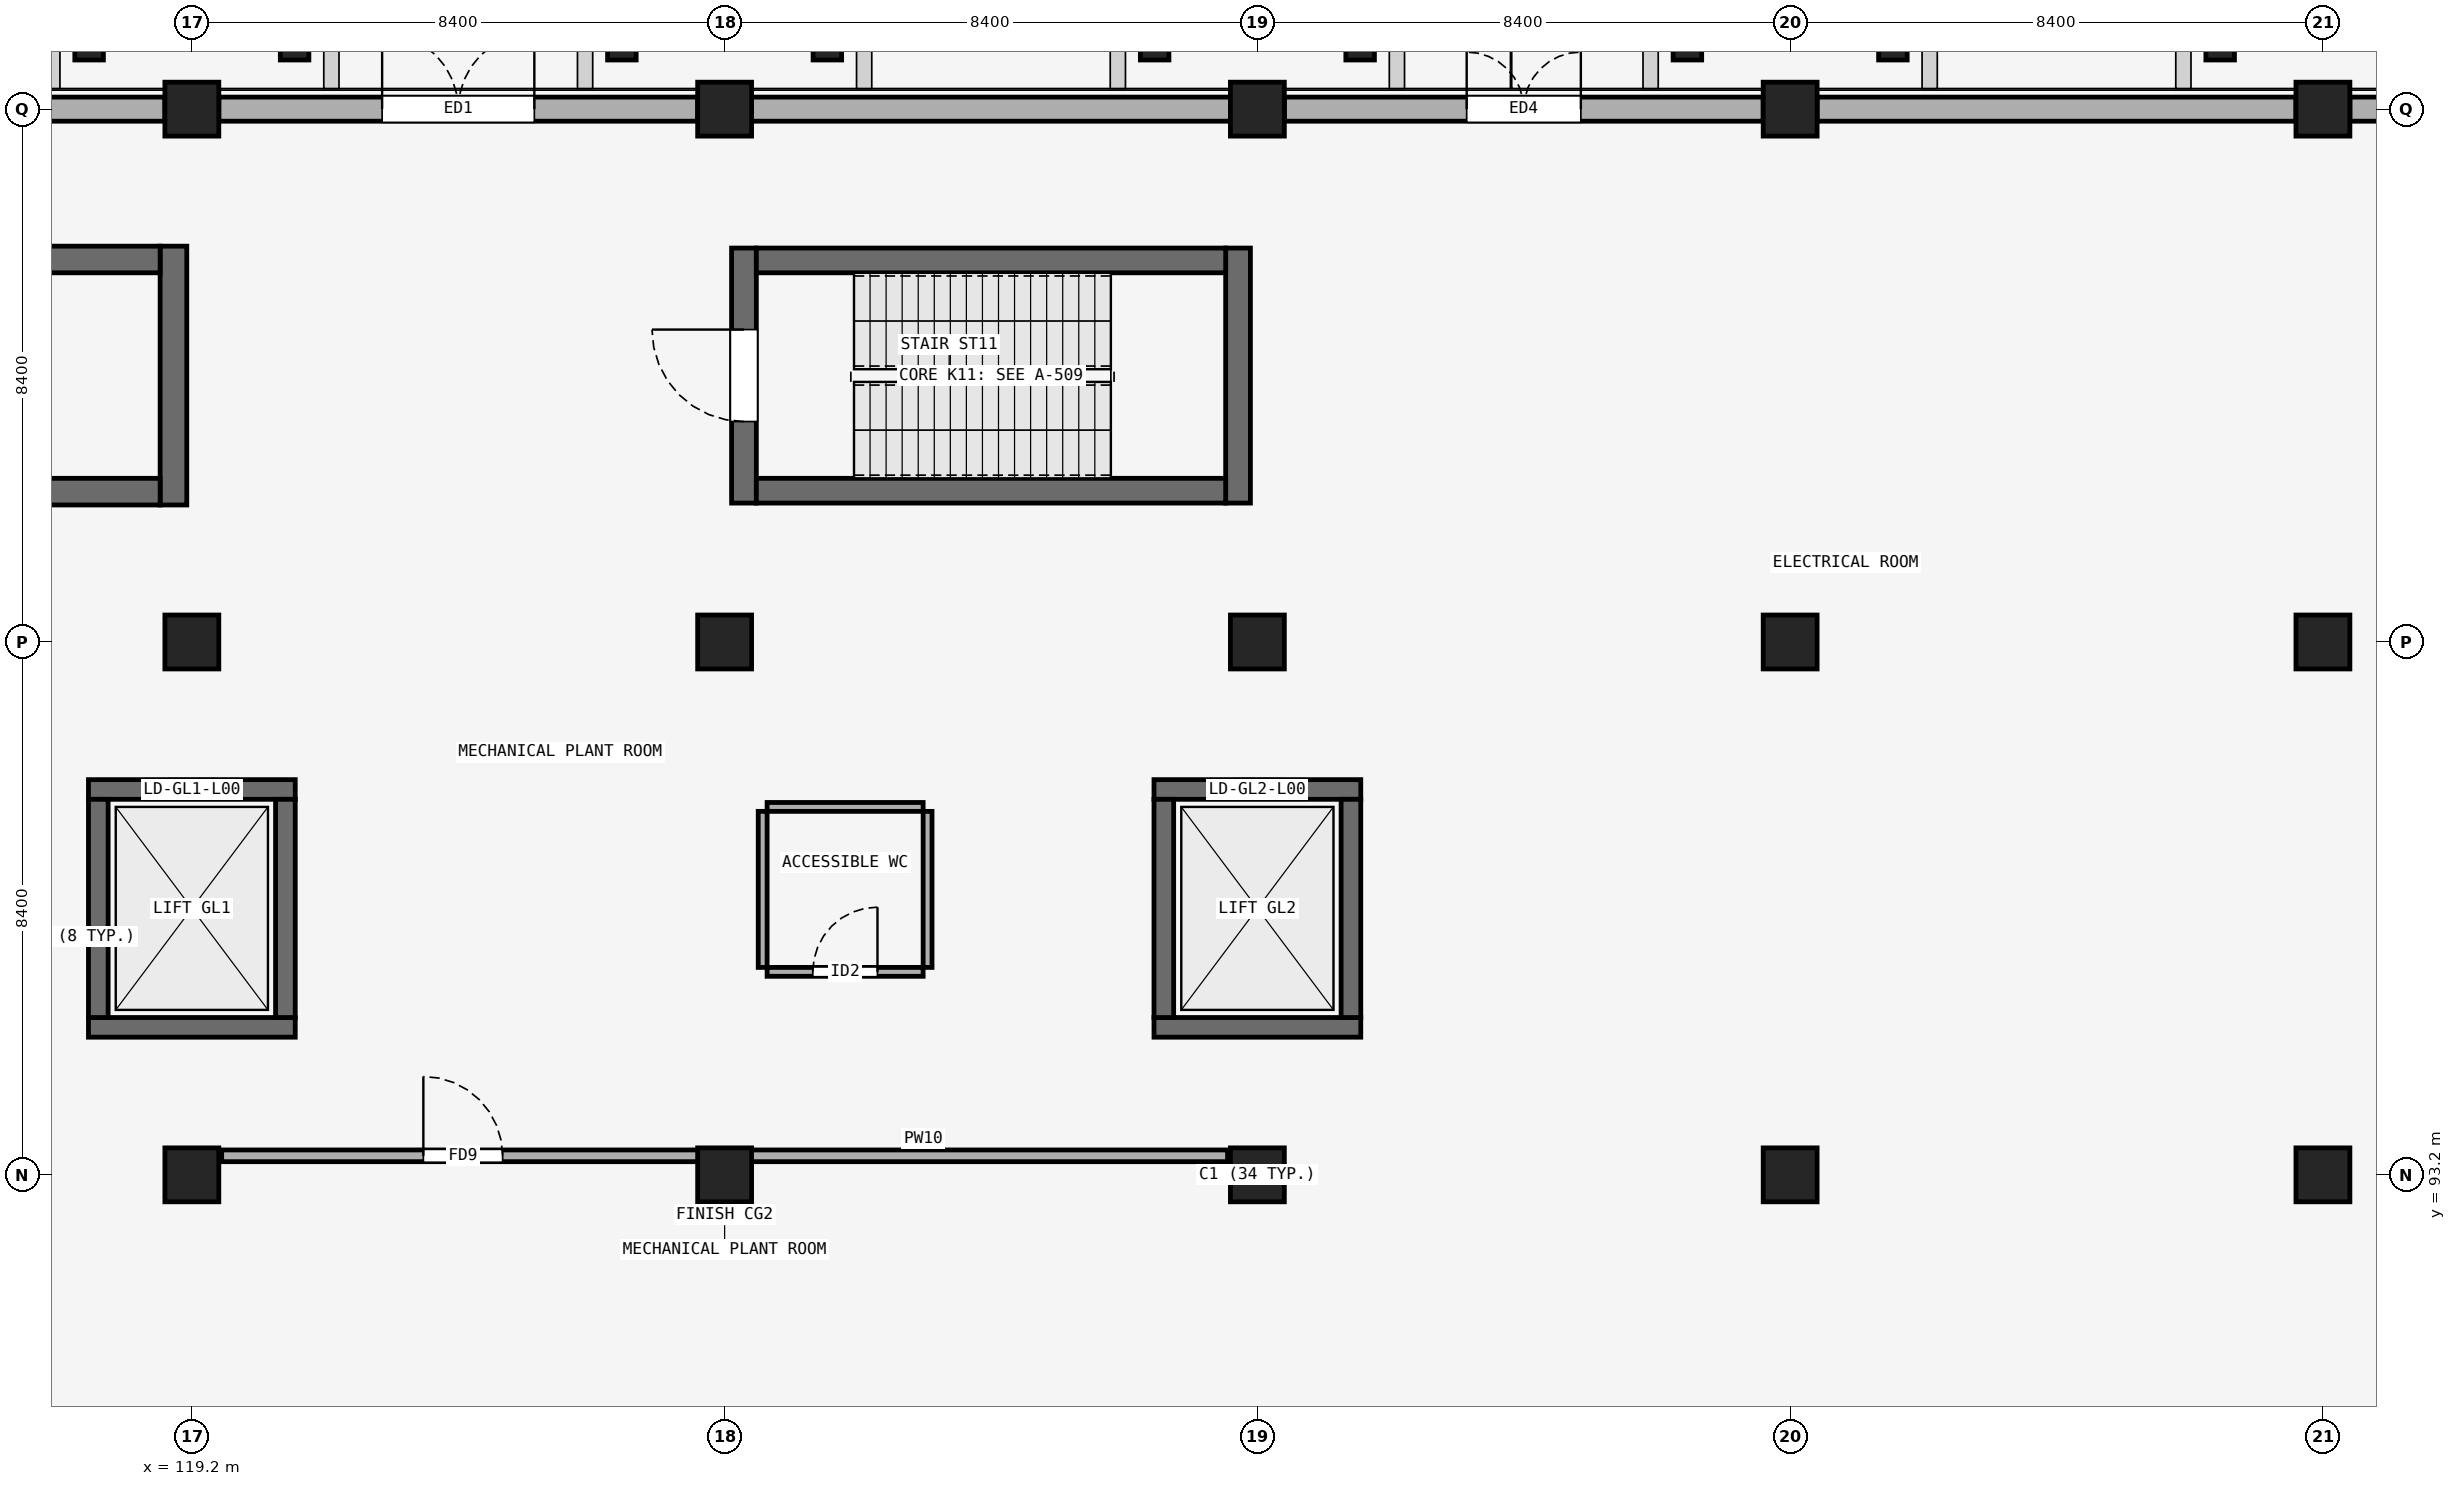
"""IFC4 building model, lengths in metres.
Left out: names, types, materials, properties, quantities, classifications, styles, units other than length and angle.
Written with IfcOpenShell. Run it as: python <this file> out.ifc"""

import sys

from ifc_helpers import new_model, si_unit, direction, frame, frame_2d, origin, origin_2d, place, context, subcontext, project, spatial, rectangle, extrude, element, fill, save


model = new_model("IFC4")
c1 = context("Model", 3, precision=1e-05, world=origin(), true_north=direction((0.0, 1.0)))
c2 = subcontext(c1, "Body", "Model", "MODEL_VIEW")
j1 = project(units=[si_unit("LENGTHUNIT", "METRE"), si_unit("PLANEANGLEUNIT", "RADIAN")], contexts=[c1])
p1 = place(None, origin())
s1 = spatial("IfcSite", under=j1, at=p1, CompositionType="ELEMENT")
p2 = place(p1, origin())
s2 = spatial("IfcBuilding", under=s1, at=p2, CompositionType="ELEMENT")
p3 = place(p2, origin())
s3 = spatial("IfcBuildingStorey", under=s2, at=p3, CompositionType="ELEMENT", Elevation=0.0)
for number, where, z_axis, x_axis in (
    (1, (119.2, 93.2, 0.0), (0.0, 0.0, 1.0), (1.0, 0.0, 0.0)),
    (2, (127.6, 93.2, 0.0), (0.0, 0.0, 1.0), (1.0, 0.0, 0.0)),
    (3, (136.0, 93.2, 0.0), (0.0, 0.0, 1.0), (1.0, 0.0, 0.0)),
    (4, (144.4, 93.2, 0.0), (0.0, 0.0, 1.0), (1.0, 0.0, 0.0)),
    (5, (152.8, 93.2, 0.0), (0.0, 0.0, 1.0), (1.0, 0.0, 0.0)),
    (6, (119.2, 101.6, 0.0), (0.0, 0.0, 1.0), (1.0, 0.0, 0.0)),
    (7, (127.6, 101.6, 0.0), (0.0, 0.0, 1.0), (1.0, 0.0, 0.0)),
    (8, (136.0, 101.6, 0.0), (0.0, 0.0, 1.0), (1.0, 0.0, 0.0)),
    (9, (144.4, 101.6, 0.0), (0.0, 0.0, 1.0), (1.0, 0.0, 0.0)),
    (10, (152.8, 101.6, 0.0), (0.0, 0.0, 1.0), (1.0, 0.0, 0.0)),
    (11, (119.2, 110.0, 0.0), (0.0, 0.0, 1.0), (1.0, 0.0, 0.0)),
    (12, (127.6, 110.0, 0.0), (0.0, 0.0, 1.0), (1.0, 0.0, 0.0)),
    (13, (136.0, 110.0, 0.0), (0.0, 0.0, 1.0), (1.0, 0.0, 0.0)),
    (14, (144.4, 110.0, 0.0), (0.0, 0.0, 1.0), (1.0, 0.0, 0.0)),
    (15, (152.8, 110.0, 0.0), (0.0, 0.0, 1.0), (1.0, 0.0, 0.0)),
):
    element("IfcColumn", number, at=place(p3, frame(where, z_axis=z_axis, x_axis=x_axis)), inside=s3, PredefinedType="COLUMN", context=c2, shape_type="SweptSolid", body=[
        extrude(rectangle(XDim=0.85, YDim=0.85, at=origin_2d()), origin(), (0.0, 0.0, 1.0), 5.4),
    ])
for number, where, z_axis, x_axis in (
    (16, (117.58, 111.05, 0.0), (0.0, 0.0, 1.0), (1.0, 0.0, 0.0)),
    (17, (120.82, 111.05, 0.0), (0.0, 0.0, 1.0), (1.0, 0.0, 0.0)),
    (18, (125.98, 111.05, 0.0), (0.0, 0.0, 1.0), (1.0, 0.0, 0.0)),
    (19, (129.22, 111.05, 0.0), (0.0, 0.0, 1.0), (1.0, 0.0, 0.0)),
    (20, (134.38, 111.05, 0.0), (0.0, 0.0, 1.0), (1.0, 0.0, 0.0)),
    (21, (137.62, 111.05, 0.0), (0.0, 0.0, 1.0), (1.0, 0.0, 0.0)),
    (22, (142.78, 111.05, 0.0), (0.0, 0.0, 1.0), (1.0, 0.0, 0.0)),
    (23, (146.02, 111.05, 0.0), (0.0, 0.0, 1.0), (1.0, 0.0, 0.0)),
    (24, (151.18, 111.05, 0.0), (0.0, 0.0, 1.0), (1.0, 0.0, 0.0)),
):
    element("IfcColumn", number, at=place(p3, frame(where, z_axis=z_axis, x_axis=x_axis)), inside=s3, PredefinedType="PILASTER", context=c2, shape_type="SweptSolid", body=[
        extrude(rectangle(XDim=0.45, YDim=0.55, at=origin_2d()), origin(), (0.0, 0.0, 1.0), 5.4),
    ])
p4 = place(p3, frame((111.225, 110.0, 0.0), z_axis=(0.0, 0.0, 1.0), x_axis=(1.0, 0.0, 0.0)))
e25 = element("IfcWall", 25, at=p4, inside=s3, PredefinedType="SOLIDWALL", context=c2, shape_type="SweptSolid", body=[
    extrude(rectangle(XDim=7.55, YDim=0.38, at=frame_2d((3.775, 0.0))), origin(), (0.0, 0.0, 1.0), 4.35),
])
p5 = place(p3, frame((119.625, 110.0, 0.0), z_axis=(0.0, 0.0, 1.0), x_axis=(1.0, 0.0, 0.0)))
e26 = element("IfcWall", 26, at=p5, inside=s3, PredefinedType="SOLIDWALL", context=c2, shape_type="SweptSolid", body=[
    extrude(rectangle(XDim=7.55, YDim=0.38, at=frame_2d((3.775, 0.0))), origin(), (0.0, 0.0, 1.0), 4.35),
])
p6 = place(p5, frame((2.575, 0.0, 0.0)))
e27 = element("IfcOpeningElement", 27, at=p6, cuts=e26, PredefinedType="OPENING", context=c2, shape_type="SweptSolid", body=[
    extrude(rectangle(XDim=2.4, YDim=2.6, at=frame_2d((1.2, 1.3))), frame((0.0, 0.2, 0.0), z_axis=(0.0, -1.0, 0.0), x_axis=(1.0, 0.0, 0.0)), (0.0, 0.0, 1.0), 0.4),
])
p7 = place(p3, frame((128.025, 110.0, 0.0), z_axis=(0.0, 0.0, 1.0), x_axis=(1.0, 0.0, 0.0)))
e28 = element("IfcWall", 28, at=p7, inside=s3, PredefinedType="SOLIDWALL", context=c2, shape_type="SweptSolid", body=[
    extrude(rectangle(XDim=7.55, YDim=0.38, at=frame_2d((3.775, 0.0))), origin(), (0.0, 0.0, 1.0), 4.35),
])
p8 = place(p3, frame((136.425, 110.0, 0.0), z_axis=(0.0, 0.0, 1.0), x_axis=(1.0, 0.0, 0.0)))
e29 = element("IfcWall", 29, at=p8, inside=s3, PredefinedType="SOLIDWALL", context=c2, shape_type="SweptSolid", body=[
    extrude(rectangle(XDim=7.55, YDim=0.38, at=frame_2d((3.775, 0.0))), origin(), (0.0, 0.0, 1.0), 4.35),
])
p9 = place(p8, frame((2.875, 0.0, 0.0)))
e30 = element("IfcOpeningElement", 30, at=p9, cuts=e29, PredefinedType="OPENING", context=c2, shape_type="SweptSolid", body=[
    extrude(rectangle(XDim=1.8, YDim=2.4, at=frame_2d((0.9, 1.2))), frame((0.0, 0.2, 0.0), z_axis=(0.0, -1.0, 0.0), x_axis=(1.0, 0.0, 0.0)), (0.0, 0.0, 1.0), 0.4),
])
p10 = place(p3, frame((144.825, 110.0, 0.0), z_axis=(0.0, 0.0, 1.0), x_axis=(1.0, 0.0, 0.0)))
e31 = element("IfcWall", 31, at=p10, inside=s3, PredefinedType="SOLIDWALL", context=c2, shape_type="SweptSolid", body=[
    extrude(rectangle(XDim=7.55, YDim=0.38, at=frame_2d((3.775, 0.0))), origin(), (0.0, 0.0, 1.0), 4.35),
])
p11 = place(p3, frame((153.225, 110.0, 0.0), z_axis=(0.0, 0.0, 1.0), x_axis=(1.0, 0.0, 0.0)))
e32 = element("IfcWall", 32, at=p11, inside=s3, PredefinedType="SOLIDWALL", context=c2, shape_type="SweptSolid", body=[
    extrude(rectangle(XDim=7.55, YDim=0.38, at=frame_2d((3.775, 0.0))), origin(), (0.0, 0.0, 1.0), 4.35),
])
p12 = place(p11, frame((3.2, 0.0, 0.0)))
e33 = element("IfcOpeningElement", 33, at=p12, cuts=e32, PredefinedType="OPENING", context=c2, shape_type="SweptSolid", body=[
    extrude(rectangle(XDim=1.15, YDim=2.15, at=frame_2d((0.575, 1.075))), frame((0.0, 0.2, 0.0), z_axis=(0.0, -1.0, 0.0), x_axis=(1.0, 0.0, 0.0)), (0.0, 0.0, 1.0), 0.4),
])
p13 = place(p3, frame((118.91, 103.76, 0.0), z_axis=(0.0, 0.0, 1.0), x_axis=(0.0, 1.0, 0.0)))
e34 = element("IfcWall", 34, at=p13, inside=s3, PredefinedType="SHEAR", context=c2, shape_type="SweptSolid", body=[
    extrude(rectangle(XDim=4.08, YDim=0.42, at=frame_2d((2.04, 0.0))), origin(), (0.0, 0.0, 1.0), 5.1),
])
for number, where, z_axis, x_axis in (
    (35, (111.3, 103.97, 0.0), (0.0, 0.0, 1.0), (1.0, 0.0, 0.0)),
    (36, (111.3, 107.63, 0.0), (0.0, 0.0, 1.0), (1.0, 0.0, 0.0)),
):
    element("IfcWall", number, at=place(p3, frame(where, z_axis=z_axis, x_axis=x_axis)), inside=s3, PredefinedType="SHEAR", context=c2, shape_type="SweptSolid", body=[
        extrude(rectangle(XDim=7.4, YDim=0.42, at=frame_2d((3.7, 0.0))), origin(), (0.0, 0.0, 1.0), 5.1),
    ])
p14 = place(p3, frame((127.905, 103.79, 0.0), z_axis=(0.0, 0.0, 1.0), x_axis=(0.0, 1.0, 0.0)))
e37 = element("IfcWall", 37, at=p14, inside=s3, PredefinedType="SHEAR", context=c2, shape_type="SweptSolid", body=[
    extrude(rectangle(XDim=4.02, YDim=0.39, at=frame_2d((2.01, 0.0))), origin(), (0.0, 0.0, 1.0), 5.1),
])
p15 = place(p14, frame((1.285, 0.0, 0.0)))
e38 = element("IfcOpeningElement", 38, at=p15, cuts=e37, PredefinedType="OPENING", context=c2, shape_type="SweptSolid", body=[
    extrude(rectangle(XDim=1.45, YDim=2.2, at=frame_2d((0.725, 1.1))), frame((0.0, 0.205, 0.0), z_axis=(0.0, -1.0, 0.0), x_axis=(1.0, 0.0, 0.0)), (0.0, 0.0, 1.0), 0.41),
])
p16 = place(p3, frame((135.695, 103.79, 0.0), z_axis=(0.0, 0.0, 1.0), x_axis=(0.0, 1.0, 0.0)))
e39 = element("IfcWall", 39, at=p16, inside=s3, PredefinedType="SHEAR", context=c2, shape_type="SweptSolid", body=[
    extrude(rectangle(XDim=4.02, YDim=0.39, at=frame_2d((2.01, 0.0))), origin(), (0.0, 0.0, 1.0), 5.1),
])
for number, where, z_axis, x_axis in (
    (40, (128.1, 103.985, 0.0), (0.0, 0.0, 1.0), (1.0, 0.0, 0.0)),
    (41, (128.1, 107.615, 0.0), (0.0, 0.0, 1.0), (1.0, 0.0, 0.0)),
):
    element("IfcWall", number, at=place(p3, frame(where, z_axis=z_axis, x_axis=x_axis)), inside=s3, PredefinedType="SHEAR", context=c2, shape_type="SweptSolid", body=[
        extrude(rectangle(XDim=7.4, YDim=0.39, at=frame_2d((3.7, 0.0))), origin(), (0.0, 0.0, 1.0), 5.1),
    ])
p17 = place(p3, frame((117.57, 95.525, 0.0), z_axis=(0.0, 0.0, 1.0), x_axis=(1.0, 0.0, 0.0)))
e42 = element("IfcWall", 42, at=p17, inside=s3, PredefinedType="SHEAR", context=c2, shape_type="SweptSolid", body=[
    extrude(rectangle(XDim=3.26, YDim=0.31, at=frame_2d((1.63, 0.0))), origin(), (0.0, 0.0, 1.0), 5.1),
])
p18 = place(p3, frame((117.57, 99.275, 0.0), z_axis=(0.0, 0.0, 1.0), x_axis=(1.0, 0.0, 0.0)))
e43 = element("IfcWall", 43, at=p18, inside=s3, PredefinedType="SHEAR", context=c2, shape_type="SweptSolid", body=[
    extrude(rectangle(XDim=3.26, YDim=0.31, at=frame_2d((1.63, 0.0))), origin(), (0.0, 0.0, 1.0), 5.1),
])
p19 = place(p18, frame((0.88, 0.0, 0.0)))
e44 = element("IfcOpeningElement", 44, at=p19, cuts=e43, PredefinedType="OPENING", context=c2, shape_type="SweptSolid", body=[
    extrude(rectangle(XDim=1.5, YDim=2.35, at=frame_2d((0.75, 1.175))), frame((0.0, 0.165, 0.0), z_axis=(0.0, -1.0, 0.0), x_axis=(1.0, 0.0, 0.0)), (0.0, 0.0, 1.0), 0.33),
])
for number, where, z_axis, x_axis in (
    (45, (117.725, 95.68, 0.0), (0.0, 0.0, 1.0), (0.0, 1.0, 0.0)),
    (46, (120.675, 95.68, 0.0), (0.0, 0.0, 1.0), (0.0, 1.0, 0.0)),
):
    element("IfcWall", number, at=place(p3, frame(where, z_axis=z_axis, x_axis=x_axis)), inside=s3, PredefinedType="SHEAR", context=c2, shape_type="SweptSolid", body=[
        extrude(rectangle(XDim=3.44, YDim=0.31, at=frame_2d((1.72, 0.0))), origin(), (0.0, 0.0, 1.0), 5.1),
    ])
p20 = place(p3, frame((134.37, 95.525, 0.0), z_axis=(0.0, 0.0, 1.0), x_axis=(1.0, 0.0, 0.0)))
e47 = element("IfcWall", 47, at=p20, inside=s3, PredefinedType="SHEAR", context=c2, shape_type="SweptSolid", body=[
    extrude(rectangle(XDim=3.26, YDim=0.31, at=frame_2d((1.63, 0.0))), origin(), (0.0, 0.0, 1.0), 5.1),
])
p21 = place(p3, frame((134.37, 99.275, 0.0), z_axis=(0.0, 0.0, 1.0), x_axis=(1.0, 0.0, 0.0)))
e48 = element("IfcWall", 48, at=p21, inside=s3, PredefinedType="SHEAR", context=c2, shape_type="SweptSolid", body=[
    extrude(rectangle(XDim=3.26, YDim=0.31, at=frame_2d((1.63, 0.0))), origin(), (0.0, 0.0, 1.0), 5.1),
])
p22 = place(p21, frame((0.88, 0.0, 0.0)))
e49 = element("IfcOpeningElement", 49, at=p22, cuts=e48, PredefinedType="OPENING", context=c2, shape_type="SweptSolid", body=[
    extrude(rectangle(XDim=1.5, YDim=2.35, at=frame_2d((0.75, 1.175))), frame((0.0, 0.165, 0.0), z_axis=(0.0, -1.0, 0.0), x_axis=(1.0, 0.0, 0.0)), (0.0, 0.0, 1.0), 0.33),
])
for number, where, z_axis, x_axis in (
    (50, (134.525, 95.68, 0.0), (0.0, 0.0, 1.0), (0.0, 1.0, 0.0)),
    (51, (137.475, 95.68, 0.0), (0.0, 0.0, 1.0), (0.0, 1.0, 0.0)),
):
    element("IfcWall", number, at=place(p3, frame(where, z_axis=z_axis, x_axis=x_axis)), inside=s3, PredefinedType="SHEAR", context=c2, shape_type="SweptSolid", body=[
        extrude(rectangle(XDim=3.44, YDim=0.31, at=frame_2d((1.72, 0.0))), origin(), (0.0, 0.0, 1.0), 5.1),
    ])
p23 = place(p3, frame((128.27, 96.4, 0.0), z_axis=(0.0, 0.0, 1.0), x_axis=(1.0, 0.0, 0.0)))
e52 = element("IfcWall", 52, at=p23, inside=s3, PredefinedType="PARTITIONING", context=c2, shape_type="SweptSolid", body=[
    extrude(rectangle(XDim=2.46, YDim=0.14, at=frame_2d((1.23, 0.0))), origin(), (0.0, 0.0, 1.0), 5.1),
])
p24 = place(p23, frame((0.72, 0.0, 0.0)))
e53 = element("IfcOpeningElement", 53, at=p24, cuts=e52, PredefinedType="OPENING", context=c2, shape_type="SweptSolid", body=[
    extrude(rectangle(XDim=1.02, YDim=2.15, at=frame_2d((0.51, 1.075))), frame((0.0, 0.08, 0.0), z_axis=(0.0, -1.0, 0.0), x_axis=(1.0, 0.0, 0.0)), (0.0, 0.0, 1.0), 0.16),
])
for number, where, z_axis, x_axis in (
    (54, (128.27, 99.0, 0.0), (0.0, 0.0, 1.0), (1.0, 0.0, 0.0)),
    (55, (128.2, 96.47, 0.0), (0.0, 0.0, 1.0), (0.0, 1.0, 0.0)),
    (56, (130.8, 96.47, 0.0), (0.0, 0.0, 1.0), (0.0, 1.0, 0.0)),
):
    element("IfcWall", number, at=place(p3, frame(where, z_axis=z_axis, x_axis=x_axis)), inside=s3, PredefinedType="PARTITIONING", context=c2, shape_type="SweptSolid", body=[
        extrude(rectangle(XDim=2.46, YDim=0.14, at=frame_2d((1.23, 0.0))), origin(), (0.0, 0.0, 1.0), 5.1),
    ])
p25 = place(p3, frame((119.67, 93.5, 0.0), z_axis=(0.0, 0.0, 1.0), x_axis=(1.0, 0.0, 0.0)))
e57 = element("IfcWall", 57, at=p25, inside=s3, PredefinedType="PARTITIONING", context=c2, shape_type="SweptSolid", body=[
    extrude(rectangle(XDim=7.61, YDim=0.185, at=frame_2d((3.805, 0.0))), origin(), (0.0, 0.0, 1.0), 4.4),
])
p26 = place(p25, frame((3.18, 0.0, 0.0)))
e58 = element("IfcOpeningElement", 58, at=p26, cuts=e57, PredefinedType="OPENING", context=c2, shape_type="SweptSolid", body=[
    extrude(rectangle(XDim=1.25, YDim=2.25, at=frame_2d((0.625, 1.125))), frame((0.0, 0.103, 0.0), z_axis=(0.0, -1.0, 0.0), x_axis=(1.0, 0.0, 0.0)), (0.0, 0.0, 1.0), 0.205),
])
p27 = place(p3, frame((127.92, 93.5, 0.0), z_axis=(0.0, 0.0, 1.0), x_axis=(1.0, 0.0, 0.0)))
e59 = element("IfcWall", 59, at=p27, inside=s3, PredefinedType="PARTITIONING", context=c2, shape_type="SweptSolid", body=[
    extrude(rectangle(XDim=7.61, YDim=0.185, at=frame_2d((3.805, 0.0))), origin(), (0.0, 0.0, 1.0), 4.4),
])
p28 = place(p6, origin())
e60 = element("IfcDoor", 60, at=p28, inside=s3, OperationType="DOUBLE_DOOR_SINGLE_SWING", PredefinedType="DOOR", context=c2, shape_type="SweptSolid", body=[
    extrude(rectangle(XDim=2.4, YDim=2.6, at=frame_2d((1.2, 1.3))), frame((0.0, 0.025, 0.0), z_axis=(0.0, -1.0, 0.0), x_axis=(1.0, 0.0, 0.0)), (0.0, 0.0, 1.0), 0.05),
])
fill(e27, e60)
p29 = place(p9, origin())
e61 = element("IfcDoor", 61, at=p29, inside=s3, OperationType="DOUBLE_DOOR_SINGLE_SWING", PredefinedType="DOOR", context=c2, shape_type="SweptSolid", body=[
    extrude(rectangle(XDim=1.8, YDim=2.4, at=frame_2d((0.9, 1.2))), frame((0.0, 0.025, 0.0), z_axis=(0.0, -1.0, 0.0), x_axis=(1.0, 0.0, 0.0)), (0.0, 0.0, 1.0), 0.05),
])
fill(e30, e61)
p30 = place(p15, origin())
e62 = element("IfcDoor", 62, at=p30, inside=s3, OperationType="SINGLE_SWING_RIGHT", PredefinedType="DOOR", context=c2, shape_type="SweptSolid", body=[
    extrude(rectangle(XDim=1.45, YDim=2.2, at=frame_2d((0.725, 1.1))), frame((0.0, 0.025, 0.0), z_axis=(0.0, -1.0, 0.0), x_axis=(1.0, 0.0, 0.0)), (0.0, 0.0, 1.0), 0.05),
])
fill(e38, e62)
p31 = place(p19, origin())
e63 = element("IfcDoor", 63, at=p31, inside=s3, OperationType="SLIDING_TO_LEFT", PredefinedType="DOOR", context=c2, shape_type="SweptSolid", body=[
    extrude(rectangle(XDim=1.5, YDim=2.35, at=frame_2d((0.75, 1.175))), frame((0.0, 0.025, 0.0), z_axis=(0.0, -1.0, 0.0), x_axis=(1.0, 0.0, 0.0)), (0.0, 0.0, 1.0), 0.05),
])
fill(e44, e63)
p32 = place(p22, origin())
e64 = element("IfcDoor", 64, at=p32, inside=s3, OperationType="SLIDING_TO_LEFT", PredefinedType="DOOR", context=c2, shape_type="SweptSolid", body=[
    extrude(rectangle(XDim=1.5, YDim=2.35, at=frame_2d((0.75, 1.175))), frame((0.0, 0.025, 0.0), z_axis=(0.0, -1.0, 0.0), x_axis=(1.0, 0.0, 0.0)), (0.0, 0.0, 1.0), 0.05),
])
fill(e49, e64)
p33 = place(p24, origin())
e65 = element("IfcDoor", 65, at=p33, inside=s3, OperationType="SINGLE_SWING_RIGHT", PredefinedType="DOOR", context=c2, shape_type="SweptSolid", body=[
    extrude(rectangle(XDim=1.02, YDim=2.15, at=frame_2d((0.51, 1.075))), frame((0.0, 0.025, 0.0), z_axis=(0.0, -1.0, 0.0), x_axis=(1.0, 0.0, 0.0)), (0.0, 0.0, 1.0), 0.05),
])
fill(e53, e65)
p34 = place(p26, origin())
e66 = element("IfcDoor", 66, at=p34, inside=s3, OperationType="SINGLE_SWING_LEFT", PredefinedType="DOOR", context=c2, shape_type="SweptSolid", body=[
    extrude(rectangle(XDim=1.25, YDim=2.25, at=frame_2d((0.625, 1.125))), frame((0.0, 0.025, 0.0), z_axis=(0.0, -1.0, 0.0), x_axis=(1.0, 0.0, 0.0)), (0.0, 0.0, 1.0), 0.05),
])
fill(e58, e66)
save(model, sys.argv[1])
